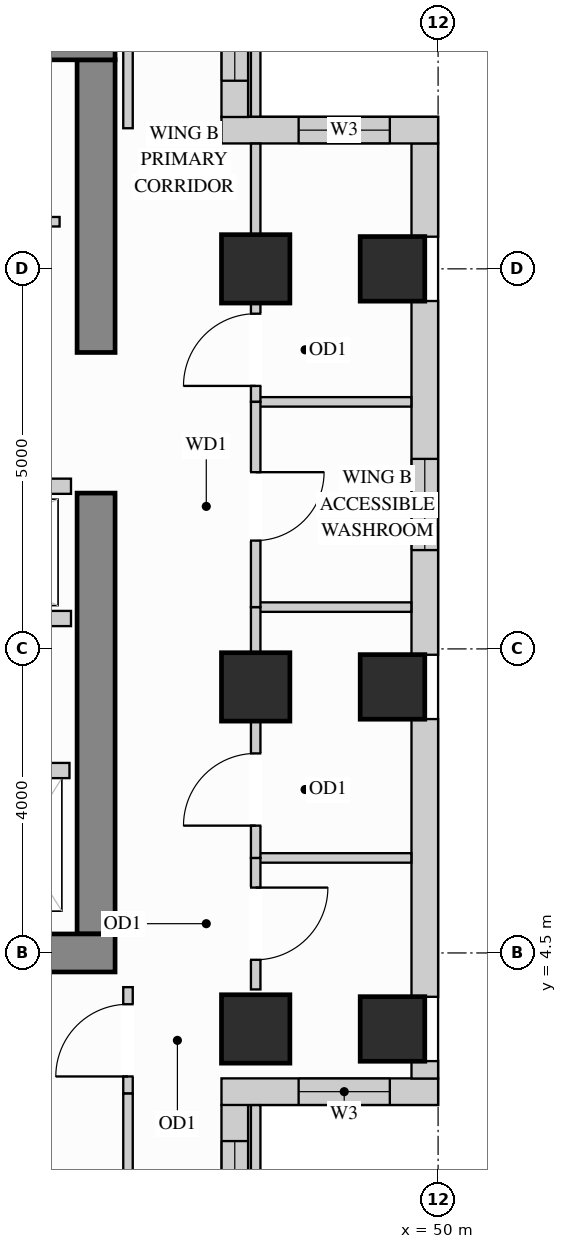
"""IFC4 building model, lengths in metres.
Left out: names, types, materials, properties, quantities, classifications, styles, units other than length and angle.
Written with IfcOpenShell. Run it as: python <this file> out.ifc"""

import sys

from ifc_helpers import new_model, si_unit, direction, frame, frame_2d, origin, origin_2d, place, context, subcontext, project, spatial, rectangle, extrude, source, transform, mapped, element, fill, save


model = new_model("IFC4")
c1 = context("Model", 3, precision=1e-05, world=origin(), true_north=direction((0.0, 1.0)))
c2 = subcontext(c1, "Body", "Model", "MODEL_VIEW")
j1 = project(units=[si_unit("LENGTHUNIT", "METRE"), si_unit("PLANEANGLEUNIT", "RADIAN")], contexts=[c1])
p1 = place(None, origin())
s1 = spatial("IfcSite", under=j1, at=p1, CompositionType="ELEMENT")
p2 = place(p1, origin())
s2 = spatial("IfcBuilding", under=s1, at=p2, CompositionType="ELEMENT")
p3 = place(p2, frame((0.0, 0.0, 252.0)))
s3 = spatial("IfcBuildingStorey", under=s2, at=p3, CompositionType="ELEMENT", Elevation=252.0)
m1 = source(origin(), c2, "Body", "SweptSolid", [
    extrude(rectangle(XDim=0.9, YDim=0.9, at=origin_2d()), origin(), (0.0, 0.0, 1.0), 3.4),
])
for number, where, z_axis, x_axis in (
    (1, (47.6, 13.5, 0.0), (0.0, 0.0, 1.0), (1.0, 0.0, 0.0)),
    (2, (47.6, 3.5, 0.0), (0.0, 0.0, 1.0), (1.0, 0.0, 0.0)),
    (3, (47.6, 8.0, 0.0), (0.0, 0.0, 1.0), (1.0, 0.0, 0.0)),
):
    element("IfcColumn", number, at=place(p3, frame(where, z_axis=z_axis, x_axis=x_axis)), inside=s3, PredefinedType="COLUMN", context=c2, shape_type="MappedRepresentation", body=[
        mapped(m1, transform((0.0, 0.0, 0.0), x_axis=(1.0, 0.0, 0.0), y_axis=(0.0, 1.0, 0.0), z_axis=(0.0, 0.0, 1.0))),
    ])
m2 = source(origin(), c2, "Body", "SweptSolid", [
    extrude(rectangle(XDim=0.85, YDim=0.85, at=origin_2d()), origin(), (0.0, 0.0, 1.0), 3.4),
])
for number, where, z_axis, x_axis in (
    (4, (49.4, 13.5, 0.0), (0.0, 0.0, 1.0), (1.0, 0.0, 0.0)),
    (5, (49.4, 3.5, 0.0), (0.0, 0.0, 1.0), (1.0, 0.0, 0.0)),
    (6, (49.4, 8.0, 0.0), (0.0, 0.0, 1.0), (1.0, 0.0, 0.0)),
):
    element("IfcColumn", number, at=place(p3, frame(where, z_axis=z_axis, x_axis=x_axis)), inside=s3, PredefinedType="COLUMN", context=c2, shape_type="MappedRepresentation", body=[
        mapped(m2, transform((0.0, 0.0, 0.0), x_axis=(1.0, 0.0, 0.0), y_axis=(0.0, 1.0, 0.0), z_axis=(0.0, 0.0, 1.0))),
    ])
m3 = source(origin(), c2, "Body", "SweptSolid", [
    extrude(rectangle(XDim=5.8, YDim=0.5, at=frame_2d((2.9, 0.0))), origin(), (0.0, 0.0, 1.0), 3.4),
])
p4 = place(p3, frame((45.5, 4.75, 0.0), z_axis=(0.0, 0.0, 1.0), x_axis=(0.0, 1.0, 0.0)))
e7 = element("IfcWall", 7, at=p4, inside=s3, PredefinedType="SHEAR", context=c2, shape_type="MappedRepresentation", body=[
    mapped(m3, transform((0.0, 0.0, 0.0), x_axis=(1.0, 0.0, 0.0), y_axis=(0.0, 1.0, 0.0), z_axis=(0.0, 0.0, 1.0))),
])
m4 = source(origin(), c2, "Body", "SweptSolid", [
    extrude(rectangle(XDim=3.85, YDim=0.5, at=frame_2d((1.925, 0.0))), origin(), (0.0, 0.0, 1.0), 3.4),
])
p5 = place(p3, frame((45.5, 12.4, 0.0), z_axis=(0.0, 0.0, 1.0), x_axis=(0.0, 1.0, 0.0)))
e8 = element("IfcWall", 8, at=p5, inside=s3, PredefinedType="SHEAR", context=c2, shape_type="MappedRepresentation", body=[
    mapped(m4, transform((0.0, 0.0, 0.0), x_axis=(1.0, 0.0, 0.0), y_axis=(0.0, 1.0, 0.0), z_axis=(0.0, 0.0, 1.0))),
])
m5 = source(origin(), c2, "Body", "SweptSolid", [
    extrude(rectangle(XDim=10.0, YDim=0.5, at=frame_2d((5.0, 0.0))), origin(), (0.0, 0.0, 1.0), 3.4),
])
for number, where, z_axis, x_axis in (
    (9, (35.75, 16.5, 0.0), (0.0, 0.0, 1.0), (1.0, 0.0, 0.0)),
    (10, (35.75, 4.5, 0.0), (0.0, 0.0, 1.0), (1.0, 0.0, 0.0)),
):
    element("IfcWall", number, at=place(p3, frame(where, z_axis=z_axis, x_axis=x_axis)), inside=s3, PredefinedType="SHEAR", context=c2, shape_type="MappedRepresentation", body=[
        mapped(m5, transform((0.0, 0.0, 0.0), x_axis=(1.0, 0.0, 0.0), y_axis=(0.0, 1.0, 0.0), z_axis=(0.0, 0.0, 1.0))),
    ])
p6 = place(p3, frame((47.325, 0.348, 0.0), z_axis=(0.0, 0.0, 1.0), x_axis=(0.0, 1.0, 0.0)))
e11 = element("IfcWall", 11, at=p6, inside=s3, PredefinedType="SOLIDWALL", context=c2, shape_type="SweptSolid", body=[
    extrude(rectangle(XDim=2.154, YDim=0.35, at=frame_2d((1.077, 0.0))), origin(), (0.0, 0.0, 1.0), 3.385),
])
p7 = place(p6, frame((0.477, 0.0, 0.78)))
e12 = element("IfcOpeningElement", 12, at=p7, cuts=e11, PredefinedType="OPENING", context=c2, shape_type="SweptSolid", body=[
    extrude(rectangle(XDim=1.2, YDim=2.25, at=frame_2d((0.6, 1.125))), frame((0.0, 0.185, 0.0), z_axis=(0.0, -1.0, 0.0), x_axis=(1.0, 0.0, 0.0)), (0.0, 0.0, 1.0), 0.37),
])
p8 = place(p3, frame((47.15, 2.675, 0.0), z_axis=(0.0, 0.0, 1.0), x_axis=(1.0, 0.0, 0.0)))
e13 = element("IfcWall", 13, at=p8, inside=s3, PredefinedType="SOLIDWALL", context=c2, shape_type="SweptSolid", body=[
    extrude(rectangle(XDim=2.85, YDim=0.35, at=frame_2d((1.425, 0.0))), origin(), (0.0, 0.0, 1.0), 3.385),
])
p9 = place(p8, frame((1.015, 0.0, 0.78)))
e14 = element("IfcOpeningElement", 14, at=p9, cuts=e13, PredefinedType="OPENING", context=c2, shape_type="SweptSolid", body=[
    extrude(rectangle(XDim=1.2, YDim=2.25, at=frame_2d((0.6, 1.125))), frame((0.0, 0.185, 0.0), z_axis=(0.0, -1.0, 0.0), x_axis=(1.0, 0.0, 0.0)), (0.0, 0.0, 1.0), 0.37),
])
m6 = source(origin(), c2, "Body", "SweptSolid", [
    extrude(rectangle(XDim=0.229, YDim=0.35, at=frame_2d((0.115, 0.0))), origin(), (0.0, 0.0, 1.0), 3.385),
])
p10 = place(p3, frame((49.825, 2.848, 0.0), z_axis=(0.0, 0.0, 1.0), x_axis=(0.0, 1.0, 0.0)))
e15 = element("IfcWall", 15, at=p10, inside=s3, PredefinedType="SOLIDWALL", context=c2, shape_type="MappedRepresentation", body=[
    mapped(m6, transform((0.0, 0.0, 0.0), x_axis=(1.0, 0.0, 0.0), y_axis=(0.0, 1.0, 0.0), z_axis=(0.0, 0.0, 1.0))),
])
m7 = source(origin(), c2, "Body", "SweptSolid", [
    extrude(rectangle(XDim=3.654, YDim=0.35, at=frame_2d((1.827, 0.0))), origin(), (0.0, 0.0, 1.0), 3.385),
])
p11 = place(p3, frame((49.825, 3.923, 0.0), z_axis=(0.0, 0.0, 1.0), x_axis=(0.0, 1.0, 0.0)))
e16 = element("IfcWall", 16, at=p11, inside=s3, PredefinedType="SOLIDWALL", context=c2, shape_type="MappedRepresentation", body=[
    mapped(m7, transform((0.0, 0.0, 0.0), x_axis=(1.0, 0.0, 0.0), y_axis=(0.0, 1.0, 0.0), z_axis=(0.0, 0.0, 1.0))),
])
p12 = place(p3, frame((49.825, 8.423, 0.0), z_axis=(0.0, 0.0, 1.0), x_axis=(0.0, 1.0, 0.0)))
e17 = element("IfcWall", 17, at=p12, inside=s3, PredefinedType="SOLIDWALL", context=c2, shape_type="SweptSolid", body=[
    extrude(rectangle(XDim=4.654, YDim=0.35, at=frame_2d((2.327, 0.0))), origin(), (0.0, 0.0, 1.0), 3.385),
])
p13 = place(p12, frame((1.377, 0.0, 0.78)))
e18 = element("IfcOpeningElement", 18, at=p13, cuts=e17, PredefinedType="OPENING", context=c2, shape_type="SweptSolid", body=[
    extrude(rectangle(XDim=1.2, YDim=2.25, at=frame_2d((0.6, 1.125))), frame((0.0, 0.185, 0.0), z_axis=(0.0, -1.0, 0.0), x_axis=(1.0, 0.0, 0.0)), (0.0, 0.0, 1.0), 0.37),
])
m8 = source(origin(), c2, "Body", "SweptSolid", [
    extrude(rectangle(XDim=1.229, YDim=0.35, at=frame_2d((0.615, 0.0))), origin(), (0.0, 0.0, 1.0), 3.385),
])
p14 = place(p3, frame((49.825, 13.923, 0.0), z_axis=(0.0, 0.0, 1.0), x_axis=(0.0, 1.0, 0.0)))
e19 = element("IfcWall", 19, at=p14, inside=s3, PredefinedType="SOLIDWALL", context=c2, shape_type="MappedRepresentation", body=[
    mapped(m8, transform((0.0, 0.0, 0.0), x_axis=(1.0, 0.0, 0.0), y_axis=(0.0, 1.0, 0.0), z_axis=(0.0, 0.0, 1.0))),
])
p15 = place(p3, frame((50.0, 15.325, 0.0), z_axis=(0.0, 0.0, 1.0), x_axis=(-1.0, 0.0, 0.0)))
e20 = element("IfcWall", 20, at=p15, inside=s3, PredefinedType="SOLIDWALL", context=c2, shape_type="SweptSolid", body=[
    extrude(rectangle(XDim=2.85, YDim=0.35, at=frame_2d((1.425, 0.0))), origin(), (0.0, 0.0, 1.0), 3.385),
])
p16 = place(p15, frame((0.635, 0.0, 0.78)))
e21 = element("IfcOpeningElement", 21, at=p16, cuts=e20, PredefinedType="OPENING", context=c2, shape_type="SweptSolid", body=[
    extrude(rectangle(XDim=1.2, YDim=2.25, at=frame_2d((0.6, 1.125))), frame((0.0, 0.185, 0.0), z_axis=(0.0, -1.0, 0.0), x_axis=(1.0, 0.0, 0.0)), (0.0, 0.0, 1.0), 0.37),
])
p17 = place(p3, frame((47.325, 15.498, 0.0), z_axis=(0.0, 0.0, 1.0), x_axis=(0.0, 1.0, 0.0)))
e22 = element("IfcWall", 22, at=p17, inside=s3, PredefinedType="SOLIDWALL", context=c2, shape_type="SweptSolid", body=[
    extrude(rectangle(XDim=2.154, YDim=0.35, at=frame_2d((1.077, 0.0))), origin(), (0.0, 0.0, 1.0), 3.385),
])
p18 = place(p17, frame((0.477, 0.0, 0.78)))
e23 = element("IfcOpeningElement", 23, at=p18, cuts=e22, PredefinedType="OPENING", context=c2, shape_type="SweptSolid", body=[
    extrude(rectangle(XDim=1.2, YDim=2.25, at=frame_2d((0.6, 1.125))), frame((0.0, 0.185, 0.0), z_axis=(0.0, -1.0, 0.0), x_axis=(1.0, 0.0, 0.0)), (0.0, 0.0, 1.0), 0.37),
])
p19 = place(p3, frame((41.8, 14.12, 0.0), z_axis=(0.0, 0.0, 1.0), x_axis=(1.0, 0.0, 0.0)))
e24 = element("IfcWall", 24, at=p19, inside=s3, PredefinedType="PARTITIONING", context=c2, shape_type="SweptSolid", body=[
    extrude(rectangle(XDim=3.22, YDim=0.125, at=frame_2d((1.61, 0.0))), origin(), (0.0, 0.0, 1.0), 3.385),
])
p20 = place(p19, frame((1.135, 0.0, 0.0)))
e25 = element("IfcOpeningElement", 25, at=p20, cuts=e24, PredefinedType="OPENING", context=c2, shape_type="SweptSolid", body=[
    extrude(rectangle(XDim=0.85, YDim=2.1, at=frame_2d((0.425, 1.05))), frame((0.0, 0.073, 0.0), z_axis=(0.0, -1.0, 0.0), x_axis=(1.0, 0.0, 0.0)), (0.0, 0.0, 1.0), 0.145),
])
m9 = source(origin(), c2, "Body", "SweptSolid", [
    extrude(rectangle(XDim=2.048, YDim=0.125, at=frame_2d((1.024, 0.0))), origin(), (0.0, 0.0, 1.0), 2.916),
])
p21 = place(p3, frame((47.6, 11.75, 0.0), z_axis=(0.0, 0.0, 1.0), x_axis=(1.0, 0.0, 0.0)))
e26 = element("IfcWall", 26, at=p21, inside=s3, PredefinedType="PARTITIONING", context=c2, shape_type="MappedRepresentation", body=[
    mapped(m9, transform((0.0, 0.0, 0.0), x_axis=(1.0, 0.0, 0.0), y_axis=(0.0, 1.0, 0.0), z_axis=(0.0, 0.0, 1.0))),
])
m10 = source(origin(), c2, "Body", "SweptSolid", [
    extrude(rectangle(XDim=2.048, YDim=0.125, at=frame_2d((1.024, 0.0))), origin(), (0.0, 0.0, 1.0), 3.385),
])
for number, where, z_axis, x_axis in (
    (27, (47.6, 5.75, 0.0), (0.0, 0.0, 1.0), (1.0, 0.0, 0.0)),
    (28, (47.6, 9.05, 0.0), (0.0, 0.0, 1.0), (1.0, 0.0, 0.0)),
):
    element("IfcWall", number, at=place(p3, frame(where, z_axis=z_axis, x_axis=x_axis)), inside=s3, PredefinedType="PARTITIONING", context=c2, shape_type="MappedRepresentation", body=[
        mapped(m10, transform((0.0, 0.0, 0.0), x_axis=(1.0, 0.0, 0.0), y_axis=(0.0, 1.0, 0.0), z_axis=(0.0, 0.0, 1.0))),
    ])
p22 = place(p3, frame((47.6, 4.02, 0.0), z_axis=(0.0, 0.0, 1.0), x_axis=(0.0, 1.0, 0.0)))
e29 = element("IfcWall", 29, at=p22, inside=s3, PredefinedType="PARTITIONING", context=c2, shape_type="SweptSolid", body=[
    extrude(rectangle(XDim=1.73, YDim=0.125, at=frame_2d((0.865, 0.0))), origin(), (0.0, 0.0, 1.0), 2.773),
])
p23 = place(p22, frame((0.39, 0.0, 0.0)))
e30 = element("IfcOpeningElement", 30, at=p23, cuts=e29, PredefinedType="OPENING", context=c2, shape_type="SweptSolid", body=[
    extrude(rectangle(XDim=0.95, YDim=2.15, at=frame_2d((0.475, 1.075))), frame((0.0, 0.073, 0.0), z_axis=(0.0, -1.0, 0.0), x_axis=(1.0, 0.0, 0.0)), (0.0, 0.0, 1.0), 0.145),
])
m11 = source(origin(), c2, "Body", "SweptSolid", [
    extrude(rectangle(XDim=2.148, YDim=0.125, at=frame_2d((1.074, 0.0))), origin(), (0.0, 0.0, 1.0), 3.385),
])
p24 = place(p3, frame((47.6, 0.35, 0.0), z_axis=(0.0, 0.0, 1.0), x_axis=(0.0, 1.0, 0.0)))
e31 = element("IfcWall", 31, at=p24, inside=s3, PredefinedType="PARTITIONING", context=c2, shape_type="MappedRepresentation", body=[
    mapped(m11, transform((0.0, 0.0, 0.0), x_axis=(1.0, 0.0, 0.0), y_axis=(0.0, 1.0, 0.0), z_axis=(0.0, 0.0, 1.0))),
])
p25 = place(p3, frame((47.6, 5.75, 0.0), z_axis=(0.0, 0.0, 1.0), x_axis=(0.0, 1.0, 0.0)))
e32 = element("IfcWall", 32, at=p25, inside=s3, PredefinedType="PARTITIONING", context=c2, shape_type="SweptSolid", body=[
    extrude(rectangle(XDim=1.8, YDim=0.125, at=frame_2d((0.9, 0.0))), origin(), (0.0, 0.0, 1.0), 2.773),
])
p26 = place(p25, frame((0.425, 0.0, 0.0)))
e33 = element("IfcOpeningElement", 33, at=p26, cuts=e32, PredefinedType="OPENING", context=c2, shape_type="SweptSolid", body=[
    extrude(rectangle(XDim=0.95, YDim=2.15, at=frame_2d((0.475, 1.075))), frame((0.0, 0.073, 0.0), z_axis=(0.0, -1.0, 0.0), x_axis=(1.0, 0.0, 0.0)), (0.0, 0.0, 1.0), 0.145),
])
m12 = source(origin(), c2, "Body", "SweptSolid", [
    extrude(rectangle(XDim=0.6, YDim=0.125, at=frame_2d((0.3, 0.0))), origin(), (0.0, 0.0, 1.0), 2.773),
])
p27 = place(p3, frame((47.6, 8.45, 0.0), z_axis=(0.0, 0.0, 1.0), x_axis=(0.0, 1.0, 0.0)))
e34 = element("IfcWall", 34, at=p27, inside=s3, PredefinedType="PARTITIONING", context=c2, shape_type="MappedRepresentation", body=[
    mapped(m12, transform((0.0, 0.0, 0.0), x_axis=(1.0, 0.0, 0.0), y_axis=(0.0, 1.0, 0.0), z_axis=(0.0, 0.0, 1.0))),
])
p28 = place(p3, frame((47.6, 11.75, 0.0), z_axis=(0.0, 0.0, 1.0), x_axis=(0.0, 1.0, 0.0)))
e35 = element("IfcWall", 35, at=p28, inside=s3, PredefinedType="PARTITIONING", context=c2, shape_type="SweptSolid", body=[
    extrude(rectangle(XDim=1.3, YDim=0.125, at=frame_2d((0.65, 0.0))), origin(), (0.0, 0.0, 1.0), 2.773),
])
p29 = place(p28, frame((0.21, 0.0, 0.0)))
e36 = element("IfcOpeningElement", 36, at=p29, cuts=e35, PredefinedType="OPENING", context=c2, shape_type="SweptSolid", body=[
    extrude(rectangle(XDim=0.95, YDim=2.15, at=frame_2d((0.475, 1.075))), frame((0.0, 0.073, 0.0), z_axis=(0.0, -1.0, 0.0), x_axis=(1.0, 0.0, 0.0)), (0.0, 0.0, 1.0), 0.145),
])
m13 = source(origin(), c2, "Body", "SweptSolid", [
    extrude(rectangle(XDim=1.198, YDim=0.125, at=frame_2d((0.599, 0.0))), origin(), (0.0, 0.0, 1.0), 3.385),
])
p30 = place(p3, frame((47.6, 13.95, 0.0), z_axis=(0.0, 0.0, 1.0), x_axis=(0.0, 1.0, 0.0)))
e37 = element("IfcWall", 37, at=p30, inside=s3, PredefinedType="PARTITIONING", context=c2, shape_type="MappedRepresentation", body=[
    mapped(m13, transform((0.0, 0.0, 0.0), x_axis=(1.0, 0.0, 0.0), y_axis=(0.0, 1.0, 0.0), z_axis=(0.0, 0.0, 1.0))),
])
p31 = place(p3, frame((47.6, 15.502, 0.0), z_axis=(0.0, 0.0, 1.0), x_axis=(0.0, 1.0, 0.0)))
e38 = element("IfcWall", 38, at=p31, inside=s3, PredefinedType="PARTITIONING", context=c2, shape_type="MappedRepresentation", body=[
    mapped(m11, transform((0.0, 0.0, 0.0), x_axis=(1.0, 0.0, 0.0), y_axis=(0.0, 1.0, 0.0), z_axis=(0.0, 0.0, 1.0))),
])
p32 = place(p3, frame((47.6, 9.05, 0.0), z_axis=(0.0, 0.0, 1.0), x_axis=(0.0, 1.0, 0.0)))
e39 = element("IfcWall", 39, at=p32, inside=s3, PredefinedType="PARTITIONING", context=c2, shape_type="SweptSolid", body=[
    extrude(rectangle(XDim=2.7, YDim=0.125, at=frame_2d((1.35, 0.0))), origin(), (0.0, 0.0, 1.0), 2.773),
])
p33 = place(p32, frame((0.875, 0.0, 0.0)))
e40 = element("IfcOpeningElement", 40, at=p33, cuts=e39, PredefinedType="OPENING", context=c2, shape_type="SweptSolid", body=[
    extrude(rectangle(XDim=0.9, YDim=2.15, at=frame_2d((0.45, 1.075))), frame((0.0, 0.073, 0.0), z_axis=(0.0, -1.0, 0.0), x_axis=(1.0, 0.0, 0.0)), (0.0, 0.0, 1.0), 0.145),
])
m14 = source(origin(), c2, "Body", "SweptSolid", [
    extrude(rectangle(XDim=2.298, YDim=0.125, at=frame_2d((1.149, 0.0))), origin(), (0.0, 0.0, 1.0), 3.385),
])
p34 = place(p3, frame((45.92, 15.35, 0.0), z_axis=(0.0, 0.0, 1.0), x_axis=(0.0, 1.0, 0.0)))
e41 = element("IfcWall", 41, at=p34, inside=s3, PredefinedType="PARTITIONING", context=c2, shape_type="MappedRepresentation", body=[
    mapped(m14, transform((0.0, 0.0, 0.0), x_axis=(1.0, 0.0, 0.0), y_axis=(0.0, 1.0, 0.0), z_axis=(0.0, 0.0, 1.0))),
])
p35 = place(p3, frame((45.92, 2.65, 0.0), z_axis=(0.0, 0.0, 1.0), x_axis=(0.0, 1.0, 0.0)))
e42 = element("IfcWall", 42, at=p35, inside=s3, PredefinedType="PARTITIONING", context=c2, shape_type="SweptSolid", body=[
    extrude(rectangle(XDim=1.4, YDim=0.125, at=frame_2d((0.7, 0.0))), origin(), (0.0, 0.0, 1.0), 3.385),
])
p36 = place(p35, frame((0.225, 0.0, 0.0)))
e43 = element("IfcOpeningElement", 43, at=p36, cuts=e42, PredefinedType="OPENING", context=c2, shape_type="SweptSolid", body=[
    extrude(rectangle(XDim=0.95, YDim=2.15, at=frame_2d((0.475, 1.075))), frame((0.0, 0.073, 0.0), z_axis=(0.0, -1.0, 0.0), x_axis=(1.0, 0.0, 0.0)), (0.0, 0.0, 1.0), 0.145),
])
p37 = place(p3, frame((45.92, 0.352, 0.0), z_axis=(0.0, 0.0, 1.0), x_axis=(0.0, 1.0, 0.0)))
e44 = element("IfcWall", 44, at=p37, inside=s3, PredefinedType="PARTITIONING", context=c2, shape_type="MappedRepresentation", body=[
    mapped(m14, transform((0.0, 0.0, 0.0), x_axis=(1.0, 0.0, 0.0), y_axis=(0.0, 1.0, 0.0), z_axis=(0.0, 0.0, 1.0))),
])
m15 = source(origin(), c2, "Body", "SweptSolid", [
    extrude(rectangle(XDim=1.3, YDim=0.2, at=frame_2d((0.65, 0.0))), origin(), (0.0, 0.0, 1.0), 3.385),
])
p38 = place(p3, frame((43.85, 6.9, 0.0), z_axis=(0.0, 0.0, 1.0), x_axis=(1.0, 0.0, 0.0)))
e45 = element("IfcWall", 45, at=p38, inside=s3, PredefinedType="PARTITIONING", context=c2, shape_type="MappedRepresentation", body=[
    mapped(m15, transform((0.0, 0.0, 0.0), x_axis=(1.0, 0.0, 0.0), y_axis=(0.0, 1.0, 0.0), z_axis=(0.0, 0.0, 1.0))),
])
m16 = source(origin(), c2, "Body", "SweptSolid", [
    extrude(rectangle(XDim=3.49, YDim=0.2, at=frame_2d((1.745, 0.0))), origin(), (0.0, 0.0, 1.0), 3.385),
])
for number, where, z_axis, x_axis in (
    (46, (41.68, 10.64, 0.0), (0.0, 0.0, 1.0), (1.0, 0.0, 0.0)),
    (47, (41.68, 8.9, 0.0), (0.0, 0.0, 1.0), (1.0, 0.0, 0.0)),
):
    element("IfcWall", number, at=place(p3, frame(where, z_axis=z_axis, x_axis=x_axis)), inside=s3, PredefinedType="PARTITIONING", context=c2, shape_type="MappedRepresentation", body=[
        mapped(m16, transform((0.0, 0.0, 0.0), x_axis=(1.0, 0.0, 0.0), y_axis=(0.0, 1.0, 0.0), z_axis=(0.0, 0.0, 1.0))),
    ])
m17 = source(origin(), c2, "Body", "SweptSolid", [
    extrude(rectangle(XDim=0.95, YDim=2.15, at=frame_2d((0.475, 1.075))), frame((0.0, 0.025, 0.0), z_axis=(0.0, -1.0, 0.0), x_axis=(1.0, 0.0, 0.0)), (0.0, 0.0, 1.0), 0.05),
])
p39 = place(p36, origin())
e48 = element("IfcDoor", 48, at=p39, inside=s3, OperationType="SINGLE_SWING_LEFT", PredefinedType="DOOR", context=c2, shape_type="MappedRepresentation", body=[
    mapped(m17, transform((0.0, 0.0, 0.0), x_axis=(1.0, 0.0, 0.0), y_axis=(0.0, 1.0, 0.0), z_axis=(0.0, 0.0, 1.0))),
])
fill(e43, e48)
p40 = place(p23, origin())
e49 = element("IfcDoor", 49, at=p40, inside=s3, OperationType="SINGLE_SWING_RIGHT", PredefinedType="DOOR", context=c2, shape_type="MappedRepresentation", body=[
    mapped(m17, transform((0.0, 0.0, 0.0), x_axis=(1.0, 0.0, 0.0), y_axis=(0.0, 1.0, 0.0), z_axis=(0.0, 0.0, 1.0))),
])
fill(e30, e49)
p41 = place(p26, origin())
e50 = element("IfcDoor", 50, at=p41, inside=s3, OperationType="SINGLE_SWING_LEFT", PredefinedType="DOOR", context=c2, shape_type="MappedRepresentation", body=[
    mapped(m17, transform((0.0, 0.0, 0.0), x_axis=(1.0, 0.0, 0.0), y_axis=(0.0, 1.0, 0.0), z_axis=(0.0, 0.0, 1.0))),
])
fill(e33, e50)
p42 = place(p29, origin())
e51 = element("IfcDoor", 51, at=p42, inside=s3, OperationType="SINGLE_SWING_LEFT", PredefinedType="DOOR", context=c2, shape_type="MappedRepresentation", body=[
    mapped(m17, transform((0.0, 0.0, 0.0), x_axis=(1.0, 0.0, 0.0), y_axis=(0.0, 1.0, 0.0), z_axis=(0.0, 0.0, 1.0))),
])
fill(e36, e51)
m18 = source(origin(), c2, "Body", "SweptSolid", [
    extrude(rectangle(XDim=0.9, YDim=2.15, at=frame_2d((0.45, 1.075))), frame((0.0, 0.025, 0.0), z_axis=(0.0, -1.0, 0.0), x_axis=(1.0, 0.0, 0.0)), (0.0, 0.0, 1.0), 0.05),
])
p43 = place(p33, origin())
e52 = element("IfcDoor", 52, at=p43, inside=s3, OperationType="SINGLE_SWING_RIGHT", PredefinedType="DOOR", context=c2, shape_type="MappedRepresentation", body=[
    mapped(m18, transform((0.0, 0.0, 0.0), x_axis=(1.0, 0.0, 0.0), y_axis=(0.0, 1.0, 0.0), z_axis=(0.0, 0.0, 1.0))),
])
fill(e40, e52)
m19 = source(origin(), c2, "Body", "SweptSolid", [
    extrude(rectangle(XDim=1.2, YDim=2.25, at=frame_2d((0.6, 1.125))), frame((0.0, 0.03, 0.0), z_axis=(0.0, -1.0, 0.0), x_axis=(1.0, 0.0, 0.0)), (0.0, 0.0, 1.0), 0.06),
])
p44 = place(p7, origin())
e53 = element("IfcWindow", 53, at=p44, inside=s3, PartitioningType="SINGLE_PANEL", PredefinedType="WINDOW", context=c2, shape_type="MappedRepresentation", body=[
    mapped(m19, transform((0.0, 0.0, 0.0), x_axis=(1.0, 0.0, 0.0), y_axis=(0.0, 1.0, 0.0), z_axis=(0.0, 0.0, 1.0))),
])
fill(e12, e53)
p45 = place(p9, origin())
e54 = element("IfcWindow", 54, at=p45, inside=s3, PartitioningType="SINGLE_PANEL", PredefinedType="WINDOW", context=c2, shape_type="MappedRepresentation", body=[
    mapped(m19, transform((0.0, 0.0, 0.0), x_axis=(1.0, 0.0, 0.0), y_axis=(0.0, 1.0, 0.0), z_axis=(0.0, 0.0, 1.0))),
])
fill(e14, e54)
p46 = place(p13, origin())
e55 = element("IfcWindow", 55, at=p46, inside=s3, PartitioningType="SINGLE_PANEL", PredefinedType="WINDOW", context=c2, shape_type="MappedRepresentation", body=[
    mapped(m19, transform((0.0, 0.0, 0.0), x_axis=(1.0, 0.0, 0.0), y_axis=(0.0, 1.0, 0.0), z_axis=(0.0, 0.0, 1.0))),
])
fill(e18, e55)
p47 = place(p16, origin())
e56 = element("IfcWindow", 56, at=p47, inside=s3, PartitioningType="SINGLE_PANEL", PredefinedType="WINDOW", context=c2, shape_type="MappedRepresentation", body=[
    mapped(m19, transform((0.0, 0.0, 0.0), x_axis=(1.0, 0.0, 0.0), y_axis=(0.0, 1.0, 0.0), z_axis=(0.0, 0.0, 1.0))),
])
fill(e21, e56)
p48 = place(p18, origin())
e57 = element("IfcWindow", 57, at=p48, inside=s3, PartitioningType="SINGLE_PANEL", PredefinedType="WINDOW", context=c2, shape_type="MappedRepresentation", body=[
    mapped(m19, transform((0.0, 0.0, 0.0), x_axis=(1.0, 0.0, 0.0), y_axis=(0.0, 1.0, 0.0), z_axis=(0.0, 0.0, 1.0))),
])
fill(e23, e57)
save(model, sys.argv[1])
